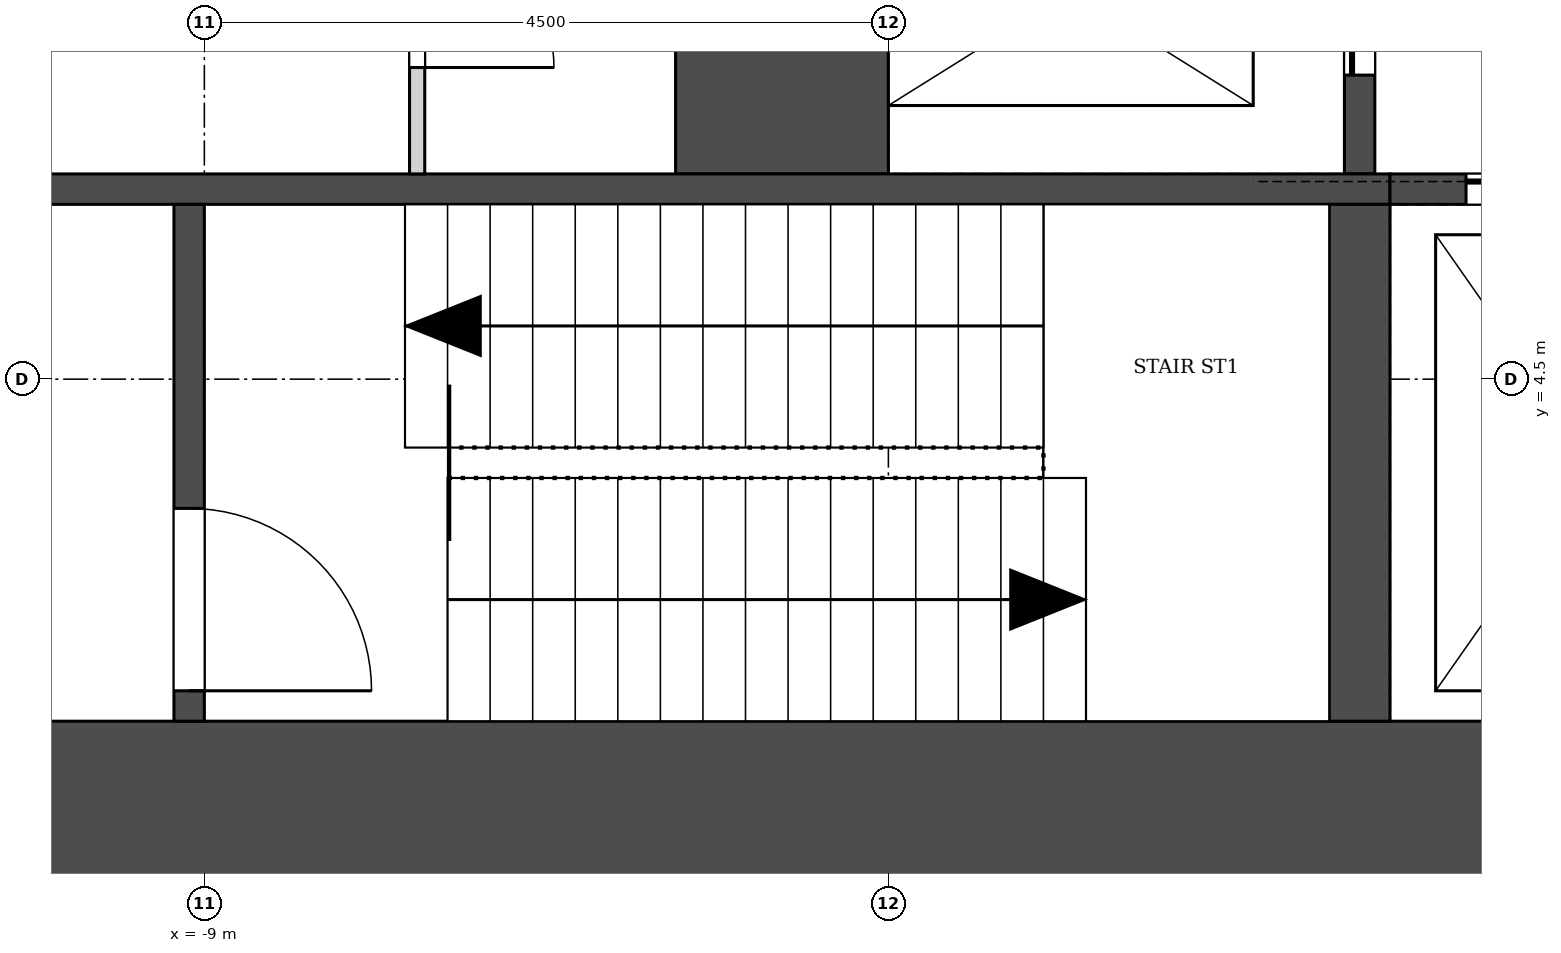
"""IFC4 building model, lengths in metres.
Left out: names, types, materials, properties, quantities, classifications, styles, units other than length and angle.
Written with IfcOpenShell. Run it as: python <this file> out.ifc"""

import sys

from ifc_helpers import new_model, si_unit, direction, frame, frame_2d, origin, place, context, subcontext, project, spatial, rectangle, extrude, element, fill, save


model = new_model("IFC4")
c1 = context("Model", 3, precision=1e-05, world=origin(), true_north=direction((0.0, 1.0)))
c2 = subcontext(c1, "Body", "Model", "MODEL_VIEW")
j1 = project(units=[si_unit("LENGTHUNIT", "METRE"), si_unit("PLANEANGLEUNIT", "RADIAN")], contexts=[c1])
p1 = place(None, origin())
s1 = spatial("IfcSite", under=j1, at=p1, CompositionType="ELEMENT")
p2 = place(p1, origin())
s2 = spatial("IfcBuilding", under=s1, at=p2, CompositionType="ELEMENT")
p3 = place(p2, frame((0.0, 0.0, 20.0)))
s3 = spatial("IfcBuildingStorey", under=s2, at=p3, CompositionType="ELEMENT", Elevation=20.0)
p4 = place(p3, frame((-14.0, 1.55, 0.0), z_axis=(0.0, 0.0, 1.0), x_axis=(1.0, 0.0, 0.0)))
e1 = element("IfcWall", 1, at=p4, inside=s3, PredefinedType="SHEAR", context=c2, shape_type="SweptSolid", body=[
    extrude(rectangle(XDim=28.0, YDim=1.4, at=frame_2d((14.0, 0.0))), origin(), (0.0, 0.0, 1.0), 5.0),
])
p5 = place(p3, frame((-1.4, 5.85, -0.3), z_axis=(0.0, 0.0, 1.0), x_axis=(0.0, 1.0, 0.0)))
e2 = element("IfcWall", 2, at=p5, inside=s3, PredefinedType="SOLIDWALL", context=c2, shape_type="SweptSolid", body=[
    extrude(rectangle(XDim=11.75, YDim=0.2, at=frame_2d((5.875, 0.0))), origin(), (0.0, 0.0, 1.0), 3.3),
])
p6 = place(p5, frame((3.2, 0.0, 0.3)))
e3 = element("IfcOpeningElement", 3, at=p6, cuts=e2, PredefinedType="OPENING", context=c2, shape_type="SweptSolid", body=[
    extrude(rectangle(XDim=1.2, YDim=2.1, at=frame_2d((0.6, 1.05))), frame((0.0, 0.11, 0.0), z_axis=(0.0, -1.0, 0.0), x_axis=(1.0, 0.0, 0.0)), (0.0, 0.0, 1.0), 0.22),
])
p7 = place(p5, frame((0.65, 0.0, 0.3)))
e4 = element("IfcOpeningElement", 4, at=p7, cuts=e2, PredefinedType="OPENING", context=c2, shape_type="SweptSolid", body=[
    extrude(rectangle(XDim=1.1, YDim=2.1, at=frame_2d((0.55, 1.05))), frame((0.0, 0.11, 0.0), z_axis=(0.0, -1.0, 0.0), x_axis=(1.0, 0.0, 0.0)), (0.0, 0.0, 1.0), 0.22),
])
p8 = place(p3, frame((-5.2, 5.85, -0.3), z_axis=(0.0, 0.0, 1.0), x_axis=(0.0, 1.0, 0.0)))
e5 = element("IfcWall", 5, at=p8, inside=s3, PredefinedType="SOLIDWALL", context=c2, shape_type="SweptSolid", body=[
    extrude(rectangle(XDim=2.4, YDim=1.4, at=frame_2d((1.2, 0.0))), origin(), (0.0, 0.0, 1.0), 3.3),
])
p9 = place(p3, frame((-12.6, 5.75, -0.3), z_axis=(0.0, 0.0, 1.0), x_axis=(1.0, 0.0, 0.0)))
e6 = element("IfcWall", 6, at=p9, inside=s3, PredefinedType="SOLIDWALL", context=c2, shape_type="SweptSolid", body=[
    extrude(rectangle(XDim=11.4, YDim=0.2, at=frame_2d((5.7, 0.0))), origin(), (0.0, 0.0, 1.0), 3.3),
])
p10 = place(p3, frame((-1.2, 5.75, -0.3), z_axis=(0.0, 0.0, 1.0), x_axis=(1.0, 0.0, 0.0)))
e7 = element("IfcWall", 7, at=p10, inside=s3, PredefinedType="SOLIDWALL", context=c2, shape_type="SweptSolid", body=[
    extrude(rectangle(XDim=2.4, YDim=0.2, at=frame_2d((1.2, 0.0))), origin(), (0.0, 0.0, 1.0), 3.3),
])
p11 = place(p10, frame((0.5, 0.0, 0.3)))
e8 = element("IfcOpeningElement", 8, at=p11, cuts=e7, PredefinedType="OPENING", context=c2, shape_type="SweptSolid", body=[
    extrude(rectangle(XDim=1.4, YDim=2.1, at=frame_2d((0.7, 1.05))), frame((0.0, 0.11, 0.0), z_axis=(0.0, -1.0, 0.0), x_axis=(1.0, 0.0, 0.0)), (0.0, 0.0, 1.0), 0.22),
])
p12 = place(p3, frame((-9.1, 2.25, -0.3), z_axis=(0.0, 0.0, 1.0), x_axis=(0.0, 1.0, 0.0)))
e9 = element("IfcWall", 9, at=p12, inside=s3, PredefinedType="SOLIDWALL", context=c2, shape_type="SweptSolid", body=[
    extrude(rectangle(XDim=3.4, YDim=0.2, at=frame_2d((1.7, 0.0))), origin(), (0.0, 0.0, 1.0), 3.3),
])
p13 = place(p12, frame((0.2, 0.0, 0.3)))
e10 = element("IfcOpeningElement", 10, at=p13, cuts=e9, PredefinedType="OPENING", context=c2, shape_type="SweptSolid", body=[
    extrude(rectangle(XDim=1.2, YDim=2.1, at=frame_2d((0.6, 1.05))), frame((0.0, 0.11, 0.0), z_axis=(0.0, -1.0, 0.0), x_axis=(1.0, 0.0, 0.0)), (0.0, 0.0, 1.0), 0.22),
])
p14 = place(p3, frame((-1.4, 2.25, -0.3), z_axis=(0.0, 0.0, 1.0), x_axis=(0.0, 1.0, 0.0)))
e11 = element("IfcWall", 11, at=p14, inside=s3, PredefinedType="SOLIDWALL", context=c2, shape_type="SweptSolid", body=[
    extrude(rectangle(XDim=3.4, YDim=0.4, at=frame_2d((1.7, 0.0))), origin(), (0.0, 0.0, 1.0), 3.3),
])
p15 = place(p3, frame((-7.6, 5.85, 0.0), z_axis=(0.0, 0.0, 1.0), x_axis=(0.0, 1.0, 0.0)))
e12 = element("IfcWall", 12, at=p15, inside=s3, PredefinedType="PARTITIONING", context=c2, shape_type="SweptSolid", body=[
    extrude(rectangle(XDim=2.4, YDim=0.1, at=frame_2d((1.2, 0.0))), origin(), (0.0, 0.0, 1.0), 3.0),
])
p16 = place(p15, frame((0.7, 0.0, 0.0)))
e13 = element("IfcOpeningElement", 13, at=p16, cuts=e12, PredefinedType="OPENING", context=c2, shape_type="SweptSolid", body=[
    extrude(rectangle(XDim=0.9, YDim=2.1, at=frame_2d((0.45, 1.05))), frame((0.0, 0.06, 0.0), z_axis=(0.0, -1.0, 0.0), x_axis=(1.0, 0.0, 0.0)), (0.0, 0.0, 1.0), 0.12),
])
p17 = place(p7, origin())
e14 = element("IfcDoor", 14, at=p17, inside=s3, OperationType="SLIDING_TO_RIGHT", PredefinedType="DOOR", context=c2, shape_type="SweptSolid", body=[
    extrude(rectangle(XDim=1.1, YDim=2.1, at=frame_2d((0.55, 1.05))), frame((0.0, 0.025, 0.0), z_axis=(0.0, -1.0, 0.0), x_axis=(1.0, 0.0, 0.0)), (0.0, 0.0, 1.0), 0.05),
])
fill(e4, e14)
p18 = place(p11, origin())
e15 = element("IfcDoor", 15, at=p18, inside=s3, OperationType="SLIDING_TO_LEFT", PredefinedType="DOOR", context=c2, shape_type="SweptSolid", body=[
    extrude(rectangle(XDim=1.4, YDim=2.1, at=frame_2d((0.7, 1.05))), frame((0.0, 0.025, 0.0), z_axis=(0.0, -1.0, 0.0), x_axis=(1.0, 0.0, 0.0)), (0.0, 0.0, 1.0), 0.05),
])
fill(e8, e15)
p19 = place(p16, frame((0.9, 0.0, 0.0), z_axis=(0.0, 0.0, 1.0), x_axis=(-1.0, 0.0, 0.0)))
e16 = element("IfcDoor", 16, at=p19, inside=s3, OperationType="SINGLE_SWING_RIGHT", PredefinedType="DOOR", context=c2, shape_type="SweptSolid", body=[
    extrude(rectangle(XDim=0.9, YDim=2.1, at=frame_2d((0.45, 1.05))), frame((0.0, 0.025, 0.0), z_axis=(0.0, -1.0, 0.0), x_axis=(1.0, 0.0, 0.0)), (0.0, 0.0, 1.0), 0.05),
])
fill(e13, e16)
p20 = place(p13, frame((1.2, 0.0, 0.0), z_axis=(0.0, 0.0, 1.0), x_axis=(-1.0, 0.0, 0.0)))
e17 = element("IfcDoor", 17, at=p20, inside=s3, OperationType="SINGLE_SWING_RIGHT", PredefinedType="DOOR", context=c2, shape_type="SweptSolid", body=[
    extrude(rectangle(XDim=1.2, YDim=2.1, at=frame_2d((0.6, 1.05))), frame((0.0, 0.025, 0.0), z_axis=(0.0, -1.0, 0.0), x_axis=(1.0, 0.0, 0.0)), (0.0, 0.0, 1.0), 0.05),
])
fill(e10, e17)
save(model, sys.argv[1])
